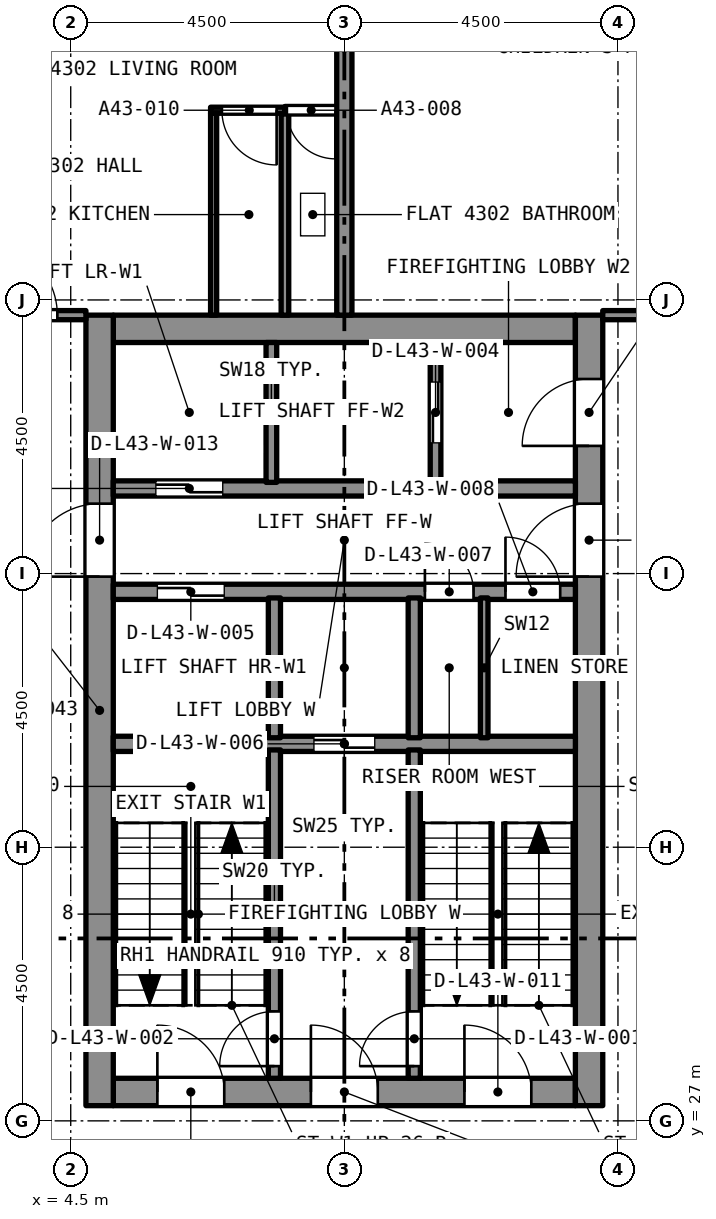
"""IFC4 building model, lengths in metres.
Left out: names, types, materials, properties, quantities, classifications, styles, units other than length and angle.
Written with IfcOpenShell. Run it as: python <this file> out.ifc"""

import sys

from ifc_helpers import new_model, si_unit, direction, frame, frame_2d, origin, place, context, subcontext, project, spatial, rectangle, extrude, element, fill, save


model = new_model("IFC4")
c1 = context("Model", 3, precision=1e-05, world=origin(), true_north=direction((0.0, 1.0)))
c2 = subcontext(c1, "Body", "Model", "MODEL_VIEW")
j1 = project(units=[si_unit("LENGTHUNIT", "METRE"), si_unit("PLANEANGLEUNIT", "RADIAN")], contexts=[c1])
p1 = place(None, origin())
s1 = spatial("IfcSite", under=j1, at=p1, CompositionType="ELEMENT")
p2 = place(p1, origin())
s2 = spatial("IfcBuilding", under=s1, at=p2, CompositionType="ELEMENT")
p3 = place(p2, frame((0.0, 0.0, 155.0)))
s3 = spatial("IfcBuildingStorey", under=s2, at=p3, CompositionType="ELEMENT", Elevation=155.0)
p4 = place(p3, frame((5.2, 27.475, 0.0), z_axis=(0.0, 0.0, 1.0), x_axis=(1.0, 0.0, 0.0)))
e1 = element("IfcWall", 1, at=p4, inside=s3, PredefinedType="SOLIDWALL", context=c2, shape_type="SweptSolid", body=[
    extrude(rectangle(XDim=7.6, YDim=0.45, at=frame_2d((3.8, 0.0))), origin(), (0.0, 0.0, 1.0), 4.4),
])
p5 = place(p4, frame((0.725, 0.0, 0.0)))
e2 = element("IfcOpeningElement", 2, at=p5, cuts=e1, PredefinedType="OPENING", context=c2, shape_type="SweptSolid", body=[
    extrude(rectangle(XDim=1.1, YDim=2.1, at=frame_2d((0.55, 1.05))), frame((0.0, 0.235, 0.0), z_axis=(0.0, -1.0, 0.0), x_axis=(1.0, 0.0, 0.0)), (0.0, 0.0, 1.0), 0.47),
])
p6 = place(p4, frame((3.25, 0.0, 0.0)))
e3 = element("IfcOpeningElement", 3, at=p6, cuts=e1, PredefinedType="OPENING", context=c2, shape_type="SweptSolid", body=[
    extrude(rectangle(XDim=1.1, YDim=2.1, at=frame_2d((0.55, 1.05))), frame((0.0, 0.235, 0.0), z_axis=(0.0, -1.0, 0.0), x_axis=(1.0, 0.0, 0.0)), (0.0, 0.0, 1.0), 0.47),
])
p7 = place(p4, frame((5.775, 0.0, 0.0)))
e4 = element("IfcOpeningElement", 4, at=p7, cuts=e1, PredefinedType="OPENING", context=c2, shape_type="SweptSolid", body=[
    extrude(rectangle(XDim=1.1, YDim=2.1, at=frame_2d((0.55, 1.05))), frame((0.0, 0.235, 0.0), z_axis=(0.0, -1.0, 0.0), x_axis=(1.0, 0.0, 0.0)), (0.0, 0.0, 1.0), 0.47),
])
p8 = place(p3, frame((5.2, 40.025, 0.0), z_axis=(0.0, 0.0, 1.0), x_axis=(1.0, 0.0, 0.0)))
e5 = element("IfcWall", 5, at=p8, inside=s3, PredefinedType="SOLIDWALL", context=c2, shape_type="SweptSolid", body=[
    extrude(rectangle(XDim=7.6, YDim=0.45, at=frame_2d((3.8, 0.0))), origin(), (0.0, 0.0, 1.0), 4.4),
])
p9 = place(p3, frame((4.975, 27.25, 0.0), z_axis=(0.0, 0.0, 1.0), x_axis=(0.0, 1.0, 0.0)))
e6 = element("IfcWall", 6, at=p9, inside=s3, PredefinedType="SOLIDWALL", context=c2, shape_type="SweptSolid", body=[
    extrude(rectangle(XDim=13.0, YDim=0.45, at=frame_2d((6.5, 0.0))), origin(), (0.0, 0.0, 1.0), 4.4),
])
p10 = place(p9, frame((8.7, 0.0, 0.0)))
e7 = element("IfcOpeningElement", 7, at=p10, cuts=e6, PredefinedType="OPENING", context=c2, shape_type="SweptSolid", body=[
    extrude(rectangle(XDim=1.2, YDim=2.1, at=frame_2d((0.6, 1.05))), frame((0.0, 0.235, 0.0), z_axis=(0.0, -1.0, 0.0), x_axis=(1.0, 0.0, 0.0)), (0.0, 0.0, 1.0), 0.47),
])
p11 = place(p3, frame((13.025, 27.25, 0.0), z_axis=(0.0, 0.0, 1.0), x_axis=(0.0, 1.0, 0.0)))
e8 = element("IfcWall", 8, at=p11, inside=s3, PredefinedType="SOLIDWALL", context=c2, shape_type="SweptSolid", body=[
    extrude(rectangle(XDim=13.0, YDim=0.45, at=frame_2d((6.5, 0.0))), origin(), (0.0, 0.0, 1.0), 4.4),
])
p12 = place(p11, frame((10.85, 0.0, 0.0)))
e9 = element("IfcOpeningElement", 9, at=p12, cuts=e8, PredefinedType="OPENING", context=c2, shape_type="SweptSolid", body=[
    extrude(rectangle(XDim=1.1, YDim=2.1, at=frame_2d((0.55, 1.05))), frame((0.0, 0.235, 0.0), z_axis=(0.0, -1.0, 0.0), x_axis=(1.0, 0.0, 0.0)), (0.0, 0.0, 1.0), 0.47),
])
p13 = place(p11, frame((8.7, 0.0, 0.0)))
e10 = element("IfcOpeningElement", 10, at=p13, cuts=e8, PredefinedType="OPENING", context=c2, shape_type="SweptSolid", body=[
    extrude(rectangle(XDim=1.2, YDim=2.1, at=frame_2d((0.6, 1.05))), frame((0.0, 0.235, 0.0), z_axis=(0.0, -1.0, 0.0), x_axis=(1.0, 0.0, 0.0)), (0.0, 0.0, 1.0), 0.47),
])
p14 = place(p3, frame((8.875, 43.62, 0.0), z_axis=(0.0, 0.0, 1.0), x_axis=(-1.0, 0.0, 0.0)))
e11 = element("IfcWall", 11, at=p14, inside=s3, PredefinedType="PARTITIONING", context=c2, shape_type="SweptSolid", body=[
    extrude(rectangle(XDim=0.852, YDim=0.125, at=frame_2d((0.426, 0.0))), origin(), (0.0, 0.0, 1.0), 4.1),
])
p15 = place(p14, frame((0.02, 0.0, 0.0)))
e12 = element("IfcOpeningElement", 12, at=p15, cuts=e11, PredefinedType="OPENING", context=c2, shape_type="SweptSolid", body=[
    extrude(rectangle(XDim=0.8, YDim=2.1, at=frame_2d((0.4, 1.05))), frame((0.0, 0.073, 0.0), z_axis=(0.0, -1.0, 0.0), x_axis=(1.0, 0.0, 0.0)), (0.0, 0.0, 1.0), 0.145),
])
p16 = place(p3, frame((8.023, 40.25, 0.0), z_axis=(0.0, 0.0, 1.0), x_axis=(0.0, 1.0, 0.0)))
e13 = element("IfcWall", 13, at=p16, inside=s3, PredefinedType="PARTITIONING", context=c2, shape_type="SweptSolid", body=[
    extrude(rectangle(XDim=3.308, YDim=0.125, at=frame_2d((1.654, 0.0))), origin(), (0.0, 0.0, 1.0), 4.1),
])
p17 = place(p3, frame((9.0, 40.25, 0.0), z_axis=(0.0, 0.0, 1.0), x_axis=(0.0, 1.0, 0.0)))
e14 = element("IfcWall", 14, at=p17, inside=s3, PredefinedType="PARTITIONING", context=c2, shape_type="SweptSolid", body=[
    extrude(rectangle(XDim=8.775, YDim=0.25, at=frame_2d((4.387, 0.0))), origin(), (0.0, 0.0, 1.0), 4.1),
])
p18 = place(p3, frame((8.023, 43.62, 0.0), z_axis=(0.0, 0.0, 1.0), x_axis=(-1.0, 0.0, 0.0)))
e15 = element("IfcWall", 15, at=p18, inside=s3, PredefinedType="PARTITIONING", context=c2, shape_type="SweptSolid", body=[
    extrude(rectangle(XDim=1.223, YDim=0.1, at=frame_2d((0.611, 0.0))), origin(), (0.0, 0.0, 1.0), 4.1),
])
p19 = place(p18, frame((0.136, 0.0, 0.0)))
e16 = element("IfcOpeningElement", 16, at=p19, cuts=e15, PredefinedType="OPENING", context=c2, shape_type="SweptSolid", body=[
    extrude(rectangle(XDim=0.9, YDim=2.1, at=frame_2d((0.45, 1.05))), frame((0.0, 0.06, 0.0), z_axis=(0.0, -1.0, 0.0), x_axis=(1.0, 0.0, 0.0)), (0.0, 0.0, 1.0), 0.12),
])
p20 = place(p3, frame((6.85, 40.25, 0.0), z_axis=(0.0, 0.0, 1.0), x_axis=(0.0, 1.0, 0.0)))
e17 = element("IfcWall", 17, at=p20, inside=s3, PredefinedType="PARTITIONING", context=c2, shape_type="SweptSolid", body=[
    extrude(rectangle(XDim=3.32, YDim=0.1, at=frame_2d((1.66, 0.0))), origin(), (0.0, 0.0, 1.0), 4.1),
])
p21 = place(p3, frame((2.95, 40.25, 0.0), z_axis=(0.0, 0.0, 1.0), x_axis=(1.0, 0.0, 0.0)))
e18 = element("IfcWall", 18, at=p21, inside=s3, PredefinedType="PARTITIONING", context=c2, shape_type="SweptSolid", body=[
    extrude(rectangle(XDim=1.8, YDim=0.15, at=frame_2d((0.9, 0.0))), origin(), (0.0, 0.0, 1.0), 4.1),
])
p22 = place(p21, frame((0.13, 0.0, 0.0)))
e19 = element("IfcOpeningElement", 19, at=p22, cuts=e18, PredefinedType="OPENING", context=c2, shape_type="SweptSolid", body=[
    extrude(rectangle(XDim=1.2, YDim=2.4, at=frame_2d((0.6, 1.2))), frame((0.0, 0.085, 0.0), z_axis=(0.0, -1.0, 0.0), x_axis=(1.0, 0.0, 0.0)), (0.0, 0.0, 1.0), 0.17),
])
p23 = place(p3, frame((13.25, 40.25, 0.0), z_axis=(0.0, 0.0, 1.0), x_axis=(1.0, 0.0, 0.0)))
e20 = element("IfcWall", 20, at=p23, inside=s3, PredefinedType="PARTITIONING", context=c2, shape_type="SweptSolid", body=[
    extrude(rectangle(XDim=2.275, YDim=0.15, at=frame_2d((1.137, 0.0))), origin(), (0.0, 0.0, 1.0), 4.1),
])
p24 = place(p23, frame((1.145, 0.0, 0.0)))
e21 = element("IfcOpeningElement", 21, at=p24, cuts=e20, PredefinedType="OPENING", context=c2, shape_type="SweptSolid", body=[
    extrude(rectangle(XDim=1.0, YDim=2.1, at=frame_2d((0.5, 1.05))), frame((0.0, 0.085, 0.0), z_axis=(0.0, -1.0, 0.0), x_axis=(1.0, 0.0, 0.0)), (0.0, 0.0, 1.0), 0.17),
])
p25 = place(p3, frame((5.2, 33.2, 0.0), z_axis=(0.0, 0.0, 1.0), x_axis=(1.0, 0.0, 0.0)))
e22 = element("IfcWall", 22, at=p25, inside=s3, PredefinedType="SOLIDWALL", context=c2, shape_type="SweptSolid", body=[
    extrude(rectangle(XDim=7.6, YDim=0.25, at=frame_2d((3.8, 0.0))), origin(), (0.0, 0.0, 1.0), 4.1),
])
p26 = place(p25, frame((3.3, 0.0, 0.0)))
e23 = element("IfcOpeningElement", 23, at=p26, cuts=e22, PredefinedType="OPENING", context=c2, shape_type="SweptSolid", body=[
    extrude(rectangle(XDim=1.0, YDim=2.1, at=frame_2d((0.5, 1.05))), frame((0.0, 0.135, 0.0), z_axis=(0.0, -1.0, 0.0), x_axis=(1.0, 0.0, 0.0)), (0.0, 0.0, 1.0), 0.27),
])
p27 = place(p3, frame((5.2, 35.7, 0.0), z_axis=(0.0, 0.0, 1.0), x_axis=(1.0, 0.0, 0.0)))
e24 = element("IfcWall", 24, at=p27, inside=s3, PredefinedType="SOLIDWALL", context=c2, shape_type="SweptSolid", body=[
    extrude(rectangle(XDim=7.6, YDim=0.25, at=frame_2d((3.8, 0.0))), origin(), (0.0, 0.0, 1.0), 4.1),
])
p28 = place(p27, frame((0.725, 0.0, 0.0)))
e25 = element("IfcOpeningElement", 25, at=p28, cuts=e24, PredefinedType="OPENING", context=c2, shape_type="SweptSolid", body=[
    extrude(rectangle(XDim=1.1, YDim=2.4, at=frame_2d((0.55, 1.2))), frame((0.0, 0.135, 0.0), z_axis=(0.0, -1.0, 0.0), x_axis=(1.0, 0.0, 0.0)), (0.0, 0.0, 1.0), 0.27),
])
p29 = place(p27, frame((5.125, 0.0, 0.0)))
e26 = element("IfcOpeningElement", 26, at=p29, cuts=e24, PredefinedType="OPENING", context=c2, shape_type="SweptSolid", body=[
    extrude(rectangle(XDim=0.8, YDim=2.1, at=frame_2d((0.4, 1.05))), frame((0.0, 0.135, 0.0), z_axis=(0.0, -1.0, 0.0), x_axis=(1.0, 0.0, 0.0)), (0.0, 0.0, 1.0), 0.27),
])
p30 = place(p27, frame((6.45, 0.0, 0.0)))
e27 = element("IfcOpeningElement", 27, at=p30, cuts=e24, PredefinedType="OPENING", context=c2, shape_type="SweptSolid", body=[
    extrude(rectangle(XDim=0.9, YDim=2.1, at=frame_2d((0.45, 1.05))), frame((0.0, 0.135, 0.0), z_axis=(0.0, -1.0, 0.0), x_axis=(1.0, 0.0, 0.0)), (0.0, 0.0, 1.0), 0.27),
])
p31 = place(p3, frame((5.2, 37.4, 0.0), z_axis=(0.0, 0.0, 1.0), x_axis=(1.0, 0.0, 0.0)))
e28 = element("IfcWall", 28, at=p31, inside=s3, PredefinedType="SOLIDWALL", context=c2, shape_type="SweptSolid", body=[
    extrude(rectangle(XDim=7.6, YDim=0.25, at=frame_2d((3.8, 0.0))), origin(), (0.0, 0.0, 1.0), 4.1),
])
p32 = place(p31, frame((0.7, 0.0, 0.0)))
e29 = element("IfcOpeningElement", 29, at=p32, cuts=e28, PredefinedType="OPENING", context=c2, shape_type="SweptSolid", body=[
    extrude(rectangle(XDim=1.1, YDim=2.4, at=frame_2d((0.55, 1.2))), frame((0.0, 0.135, 0.0), z_axis=(0.0, -1.0, 0.0), x_axis=(1.0, 0.0, 0.0)), (0.0, 0.0, 1.0), 0.27),
])
p33 = place(p3, frame((7.85, 27.7, 0.0), z_axis=(0.0, 0.0, 1.0), x_axis=(0.0, 1.0, 0.0)))
e30 = element("IfcWall", 30, at=p33, inside=s3, PredefinedType="SOLIDWALL", context=c2, shape_type="SweptSolid", body=[
    extrude(rectangle(XDim=5.4, YDim=0.2, at=frame_2d((2.7, 0.0))), origin(), (0.0, 0.0, 1.0), 4.1),
])
p34 = place(p33, frame((0.2, 0.0, 0.0)))
e31 = element("IfcOpeningElement", 31, at=p34, cuts=e30, PredefinedType="OPENING", context=c2, shape_type="SweptSolid", body=[
    extrude(rectangle(XDim=0.9, YDim=2.1, at=frame_2d((0.45, 1.05))), frame((0.0, 0.11, 0.0), z_axis=(0.0, -1.0, 0.0), x_axis=(1.0, 0.0, 0.0)), (0.0, 0.0, 1.0), 0.22),
])
p35 = place(p3, frame((10.15, 27.7, 0.0), z_axis=(0.0, 0.0, 1.0), x_axis=(0.0, 1.0, 0.0)))
e32 = element("IfcWall", 32, at=p35, inside=s3, PredefinedType="SOLIDWALL", context=c2, shape_type="SweptSolid", body=[
    extrude(rectangle(XDim=5.4, YDim=0.2, at=frame_2d((2.7, 0.0))), origin(), (0.0, 0.0, 1.0), 4.1),
])
p36 = place(p35, frame((0.2, 0.0, 0.0)))
e33 = element("IfcOpeningElement", 33, at=p36, cuts=e32, PredefinedType="OPENING", context=c2, shape_type="SweptSolid", body=[
    extrude(rectangle(XDim=0.9, YDim=2.1, at=frame_2d((0.45, 1.05))), frame((0.0, 0.11, 0.0), z_axis=(0.0, -1.0, 0.0), x_axis=(1.0, 0.0, 0.0)), (0.0, 0.0, 1.0), 0.22),
])
for number, where, z_axis, x_axis in (
    (34, (7.85, 33.3, 0.0), (0.0, 0.0, 1.0), (0.0, 1.0, 0.0)),
    (35, (10.15, 33.3, 0.0), (0.0, 0.0, 1.0), (0.0, 1.0, 0.0)),
):
    element("IfcWall", number, at=place(p3, frame(where, z_axis=z_axis, x_axis=x_axis)), inside=s3, PredefinedType="SOLIDWALL", context=c2, shape_type="SweptSolid", body=[
        extrude(rectangle(XDim=2.3, YDim=0.2, at=frame_2d((1.15, 0.0))), origin(), (0.0, 0.0, 1.0), 4.1),
    ])
p37 = place(p3, frame((7.8, 37.5, 0.0), z_axis=(0.0, 0.0, 1.0), x_axis=(0.0, 1.0, 0.0)))
e36 = element("IfcWall", 36, at=p37, inside=s3, PredefinedType="SOLIDWALL", context=c2, shape_type="SweptSolid", body=[
    extrude(rectangle(XDim=2.3, YDim=0.175, at=frame_2d((1.15, 0.0))), origin(), (0.0, 0.0, 1.0), 4.1),
])
p38 = place(p3, frame((10.5, 37.5, 0.0), z_axis=(0.0, 0.0, 1.0), x_axis=(0.0, 1.0, 0.0)))
e37 = element("IfcWall", 37, at=p38, inside=s3, PredefinedType="SOLIDWALL", context=c2, shape_type="SweptSolid", body=[
    extrude(rectangle(XDim=2.3, YDim=0.175, at=frame_2d((1.15, 0.0))), origin(), (0.0, 0.0, 1.0), 4.1),
])
p39 = place(p38, frame((0.65, 0.0, 0.0)))
e38 = element("IfcOpeningElement", 38, at=p39, cuts=e37, PredefinedType="OPENING", context=c2, shape_type="SweptSolid", body=[
    extrude(rectangle(XDim=1.0, YDim=2.1, at=frame_2d((0.5, 1.05))), frame((0.0, 0.097, 0.0), z_axis=(0.0, -1.0, 0.0), x_axis=(1.0, 0.0, 0.0)), (0.0, 0.0, 1.0), 0.195),
])
p40 = place(p3, frame((11.3, 33.3, 0.0), z_axis=(0.0, 0.0, 1.0), x_axis=(0.0, 1.0, 0.0)))
e39 = element("IfcWall", 39, at=p40, inside=s3, PredefinedType="PARTITIONING", context=c2, shape_type="SweptSolid", body=[
    extrude(rectangle(XDim=2.3, YDim=0.125, at=frame_2d((1.15, 0.0))), origin(), (0.0, 0.0, 1.0), 4.1),
])
p41 = place(p15, origin())
e40 = element("IfcDoor", 40, at=p41, inside=s3, OperationType="SINGLE_SWING_LEFT", PredefinedType="DOOR", context=c2, shape_type="SweptSolid", body=[
    extrude(rectangle(XDim=0.8, YDim=2.1, at=frame_2d((0.4, 1.05))), frame((0.0, 0.025, 0.0), z_axis=(0.0, -1.0, 0.0), x_axis=(1.0, 0.0, 0.0)), (0.0, 0.0, 1.0), 0.05),
])
fill(e12, e40)
p42 = place(p19, origin())
e41 = element("IfcDoor", 41, at=p42, inside=s3, OperationType="SINGLE_SWING_LEFT", PredefinedType="DOOR", context=c2, shape_type="SweptSolid", body=[
    extrude(rectangle(XDim=0.9, YDim=2.1, at=frame_2d((0.45, 1.05))), frame((0.0, 0.025, 0.0), z_axis=(0.0, -1.0, 0.0), x_axis=(1.0, 0.0, 0.0)), (0.0, 0.0, 1.0), 0.05),
])
fill(e16, e41)
p43 = place(p22, origin())
e42 = element("IfcDoor", 42, at=p43, inside=s3, OperationType="SINGLE_SWING_LEFT", PredefinedType="DOOR", context=c2, shape_type="SweptSolid", body=[
    extrude(rectangle(XDim=1.2, YDim=2.4, at=frame_2d((0.6, 1.2))), frame((0.0, 0.025, 0.0), z_axis=(0.0, -1.0, 0.0), x_axis=(1.0, 0.0, 0.0)), (0.0, 0.0, 1.0), 0.05),
])
fill(e19, e42)
p44 = place(p34, origin())
e43 = element("IfcDoor", 43, at=p44, inside=s3, OperationType="SINGLE_SWING_LEFT", PredefinedType="DOOR", context=c2, shape_type="SweptSolid", body=[
    extrude(rectangle(XDim=0.9, YDim=2.1, at=frame_2d((0.45, 1.05))), frame((0.0, 0.025, 0.0), z_axis=(0.0, -1.0, 0.0), x_axis=(1.0, 0.0, 0.0)), (0.0, 0.0, 1.0), 0.05),
])
fill(e31, e43)
p45 = place(p36, origin())
e44 = element("IfcDoor", 44, at=p45, inside=s3, OperationType="SINGLE_SWING_LEFT", PredefinedType="DOOR", context=c2, shape_type="SweptSolid", body=[
    extrude(rectangle(XDim=0.9, YDim=2.1, at=frame_2d((0.45, 1.05))), frame((0.0, 0.025, 0.0), z_axis=(0.0, -1.0, 0.0), x_axis=(1.0, 0.0, 0.0)), (0.0, 0.0, 1.0), 0.05),
])
fill(e33, e44)
p46 = place(p32, origin())
e45 = element("IfcDoor", 45, at=p46, inside=s3, OperationType="SLIDING_TO_LEFT", PredefinedType="DOOR", context=c2, shape_type="SweptSolid", body=[
    extrude(rectangle(XDim=1.1, YDim=2.4, at=frame_2d((0.55, 1.2))), frame((0.0, 0.025, 0.0), z_axis=(0.0, -1.0, 0.0), x_axis=(1.0, 0.0, 0.0)), (0.0, 0.0, 1.0), 0.05),
])
fill(e29, e45)
p47 = place(p39, origin())
e46 = element("IfcDoor", 46, at=p47, inside=s3, OperationType="SLIDING_TO_LEFT", PredefinedType="DOOR", context=c2, shape_type="SweptSolid", body=[
    extrude(rectangle(XDim=1.0, YDim=2.1, at=frame_2d((0.5, 1.05))), frame((0.0, 0.025, 0.0), z_axis=(0.0, -1.0, 0.0), x_axis=(1.0, 0.0, 0.0)), (0.0, 0.0, 1.0), 0.05),
])
fill(e38, e46)
p48 = place(p28, origin())
e47 = element("IfcDoor", 47, at=p48, inside=s3, OperationType="SLIDING_TO_LEFT", PredefinedType="DOOR", context=c2, shape_type="SweptSolid", body=[
    extrude(rectangle(XDim=1.1, YDim=2.4, at=frame_2d((0.55, 1.2))), frame((0.0, 0.025, 0.0), z_axis=(0.0, -1.0, 0.0), x_axis=(1.0, 0.0, 0.0)), (0.0, 0.0, 1.0), 0.05),
])
fill(e25, e47)
p49 = place(p26, origin())
e48 = element("IfcDoor", 48, at=p49, inside=s3, OperationType="SLIDING_TO_LEFT", PredefinedType="DOOR", context=c2, shape_type="SweptSolid", body=[
    extrude(rectangle(XDim=1.0, YDim=2.1, at=frame_2d((0.5, 1.05))), frame((0.0, 0.025, 0.0), z_axis=(0.0, -1.0, 0.0), x_axis=(1.0, 0.0, 0.0)), (0.0, 0.0, 1.0), 0.05),
])
fill(e23, e48)
p50 = place(p29, origin())
e49 = element("IfcDoor", 49, at=p50, inside=s3, OperationType="SINGLE_SWING_LEFT", PredefinedType="DOOR", context=c2, shape_type="SweptSolid", body=[
    extrude(rectangle(XDim=0.8, YDim=2.1, at=frame_2d((0.4, 1.05))), frame((0.0, 0.025, 0.0), z_axis=(0.0, -1.0, 0.0), x_axis=(1.0, 0.0, 0.0)), (0.0, 0.0, 1.0), 0.05),
])
fill(e26, e49)
p51 = place(p30, origin())
e50 = element("IfcDoor", 50, at=p51, inside=s3, OperationType="SINGLE_SWING_LEFT", PredefinedType="DOOR", context=c2, shape_type="SweptSolid", body=[
    extrude(rectangle(XDim=0.9, YDim=2.1, at=frame_2d((0.45, 1.05))), frame((0.0, 0.025, 0.0), z_axis=(0.0, -1.0, 0.0), x_axis=(1.0, 0.0, 0.0)), (0.0, 0.0, 1.0), 0.05),
])
fill(e27, e50)
p52 = place(p5, origin())
e51 = element("IfcDoor", 51, at=p52, inside=s3, OperationType="SINGLE_SWING_LEFT", PredefinedType="DOOR", context=c2, shape_type="SweptSolid", body=[
    extrude(rectangle(XDim=1.1, YDim=2.1, at=frame_2d((0.55, 1.05))), frame((0.0, 0.025, 0.0), z_axis=(0.0, -1.0, 0.0), x_axis=(1.0, 0.0, 0.0)), (0.0, 0.0, 1.0), 0.05),
])
fill(e2, e51)
p53 = place(p6, origin())
e52 = element("IfcDoor", 52, at=p53, inside=s3, OperationType="SINGLE_SWING_LEFT", PredefinedType="DOOR", context=c2, shape_type="SweptSolid", body=[
    extrude(rectangle(XDim=1.1, YDim=2.1, at=frame_2d((0.55, 1.05))), frame((0.0, 0.025, 0.0), z_axis=(0.0, -1.0, 0.0), x_axis=(1.0, 0.0, 0.0)), (0.0, 0.0, 1.0), 0.05),
])
fill(e3, e52)
p54 = place(p7, origin())
e53 = element("IfcDoor", 53, at=p54, inside=s3, OperationType="SINGLE_SWING_LEFT", PredefinedType="DOOR", context=c2, shape_type="SweptSolid", body=[
    extrude(rectangle(XDim=1.1, YDim=2.1, at=frame_2d((0.55, 1.05))), frame((0.0, 0.025, 0.0), z_axis=(0.0, -1.0, 0.0), x_axis=(1.0, 0.0, 0.0)), (0.0, 0.0, 1.0), 0.05),
])
fill(e4, e53)
p55 = place(p12, origin())
e54 = element("IfcDoor", 54, at=p55, inside=s3, OperationType="SINGLE_SWING_LEFT", PredefinedType="DOOR", context=c2, shape_type="SweptSolid", body=[
    extrude(rectangle(XDim=1.1, YDim=2.1, at=frame_2d((0.55, 1.05))), frame((0.0, 0.025, 0.0), z_axis=(0.0, -1.0, 0.0), x_axis=(1.0, 0.0, 0.0)), (0.0, 0.0, 1.0), 0.05),
])
fill(e9, e54)
p56 = place(p10, origin())
e55 = element("IfcDoor", 55, at=p56, inside=s3, OperationType="SINGLE_SWING_LEFT", PredefinedType="DOOR", context=c2, shape_type="SweptSolid", body=[
    extrude(rectangle(XDim=1.2, YDim=2.1, at=frame_2d((0.6, 1.05))), frame((0.0, 0.025, 0.0), z_axis=(0.0, -1.0, 0.0), x_axis=(1.0, 0.0, 0.0)), (0.0, 0.0, 1.0), 0.05),
])
fill(e7, e55)
p57 = place(p13, origin())
e56 = element("IfcDoor", 56, at=p57, inside=s3, OperationType="SINGLE_SWING_LEFT", PredefinedType="DOOR", context=c2, shape_type="SweptSolid", body=[
    extrude(rectangle(XDim=1.2, YDim=2.1, at=frame_2d((0.6, 1.05))), frame((0.0, 0.025, 0.0), z_axis=(0.0, -1.0, 0.0), x_axis=(1.0, 0.0, 0.0)), (0.0, 0.0, 1.0), 0.05),
])
fill(e10, e56)
save(model, sys.argv[1])
